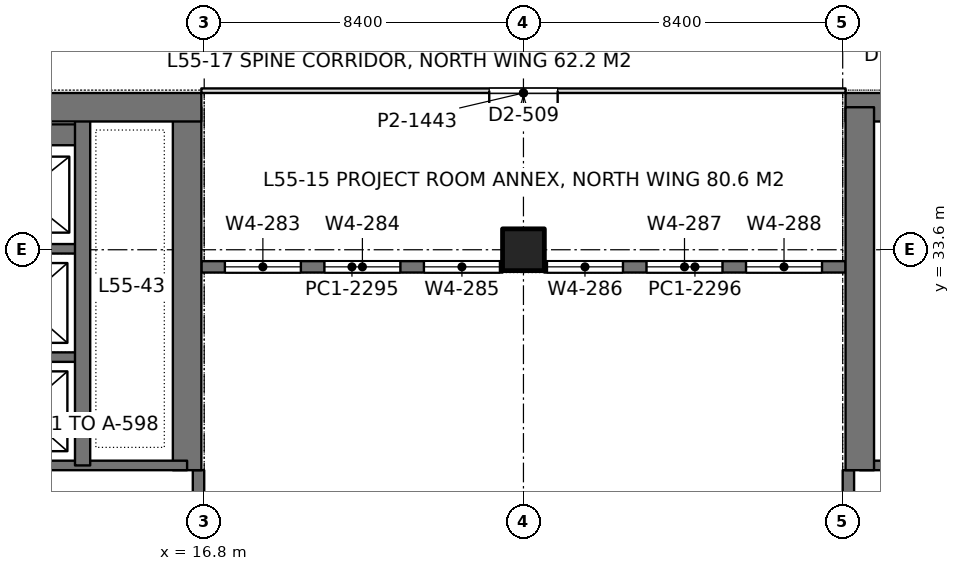
"""IFC4 building model, lengths in metres.
Left out: names, types, materials, properties, quantities, classifications, styles, units other than length and angle.
Written with IfcOpenShell. Run it as: python <this file> out.ifc"""

import sys

from ifc_helpers import new_model, si_unit, direction, frame, frame_2d, origin, origin_2d, place, context, subcontext, project, spatial, rectangle, extrude, element, fill, save


model = new_model("IFC4")
c1 = context("Model", 3, precision=1e-05, world=origin(), true_north=direction((0.0, 1.0)))
c2 = subcontext(c1, "Body", "Model", "MODEL_VIEW")
j1 = project(units=[si_unit("LENGTHUNIT", "METRE"), si_unit("PLANEANGLEUNIT", "RADIAN")], contexts=[c1])
p1 = place(None, origin())
s1 = spatial("IfcSite", under=j1, at=p1, CompositionType="ELEMENT")
p2 = place(p1, origin())
s2 = spatial("IfcBuilding", under=s1, at=p2, CompositionType="ELEMENT")
p3 = place(p2, frame((0.0, 0.0, 240.6)))
s3 = spatial("IfcBuildingStorey", under=s2, at=p3, CompositionType="ELEMENT", Elevation=240.6)
p4 = place(p3, frame((25.2, 33.6, 0.0), z_axis=(0.0, 0.0, 1.0), x_axis=(1.0, 0.0, 0.0)))
e1 = element("IfcColumn", 1, at=p4, inside=s3, PredefinedType="COLUMN", context=c2, shape_type="SweptSolid", body=[
    extrude(rectangle(XDim=1.1, YDim=1.1, at=origin_2d()), origin(), (0.0, 0.0, 1.0), 4.2),
])
p5 = place(p3, frame((-1.125, 37.35, 0.0), z_axis=(0.0, 0.0, 1.0), x_axis=(1.0, 0.0, 0.0)))
e2 = element("IfcWall", 2, at=p5, inside=s3, PredefinedType="SHEAR", context=c2, shape_type="SweptSolid", body=[
    extrude(rectangle(XDim=17.85, YDim=0.75, at=frame_2d((8.925, 0.0))), origin(), (0.0, 0.0, 1.0), 4.2),
])
p6 = place(p5, frame((8.875, 0.0, 0.0)))
e3 = element("IfcOpeningElement", 3, at=p6, cuts=e2, PredefinedType="OPENING", context=c2, shape_type="SweptSolid", body=[
    extrude(rectangle(XDim=1.8, YDim=2.4, at=frame_2d((0.9, 1.2))), frame((0.0, 0.385, 0.0), z_axis=(0.0, -1.0, 0.0), x_axis=(1.0, 0.0, 0.0)), (0.0, 0.0, 1.0), 0.77),
])
p7 = place(p3, frame((16.35, 27.8, 0.0), z_axis=(0.0, 0.0, 1.0), x_axis=(0.0, 1.0, 0.0)))
e4 = element("IfcWall", 4, at=p7, inside=s3, PredefinedType="SHEAR", context=c2, shape_type="SweptSolid", body=[
    extrude(rectangle(XDim=9.55, YDim=0.75, at=frame_2d((4.775, 0.0))), origin(), (0.0, 0.0, 1.0), 4.2),
])
p8 = place(p3, frame((13.6, 27.925, 0.0), z_axis=(0.0, 0.0, 1.0), x_axis=(0.0, 1.0, 0.0)))
e5 = element("IfcWall", 5, at=p8, inside=s3, PredefinedType="SHEAR", context=c2, shape_type="SweptSolid", body=[
    extrude(rectangle(XDim=9.425, YDim=0.4, at=frame_2d((4.712, 0.0))), origin(), (0.0, 0.0, 1.0), 4.2),
])
p9 = place(p3, frame((10.4, 27.925, 0.0), z_axis=(0.0, 0.0, 1.0), x_axis=(1.0, 0.0, 0.0)))
e6 = element("IfcWall", 6, at=p9, inside=s3, PredefinedType="SHEAR", context=c2, shape_type="SweptSolid", body=[
    extrude(rectangle(XDim=5.95, YDim=0.25, at=frame_2d((2.975, 0.0))), origin(), (0.0, 0.0, 1.0), 4.2),
])
for number, where, z_axis, x_axis in (
    (7, (10.4, 30.775, 0.0), (0.0, 0.0, 1.0), (1.0, 0.0, 0.0)),
    (8, (10.4, 33.625, 0.0), (0.0, 0.0, 1.0), (1.0, 0.0, 0.0)),
):
    element("IfcWall", number, at=place(p3, frame(where, z_axis=z_axis, x_axis=x_axis)), inside=s3, PredefinedType="SHEAR", context=c2, shape_type="SweptSolid", body=[
        extrude(rectangle(XDim=3.2, YDim=0.25, at=frame_2d((1.6, 0.0))), origin(), (0.0, 0.0, 1.0), 4.2),
    ])
p10 = place(p3, frame((10.4, 36.625, 0.0), z_axis=(0.0, 0.0, 1.0), x_axis=(1.0, 0.0, 0.0)))
e9 = element("IfcWall", 9, at=p10, inside=s3, PredefinedType="SHEAR", context=c2, shape_type="SweptSolid", body=[
    extrude(rectangle(XDim=3.2, YDim=0.55, at=frame_2d((1.6, 0.0))), origin(), (0.0, 0.0, 1.0), 4.2),
])
p11 = place(p3, frame((33.675, 37.35, 0.0), z_axis=(0.0, 0.0, 1.0), x_axis=(1.0, 0.0, 0.0)))
e10 = element("IfcWall", 10, at=p11, inside=s3, PredefinedType="SHEAR", context=c2, shape_type="SweptSolid", body=[
    extrude(rectangle(XDim=17.85, YDim=0.75, at=frame_2d((8.925, 0.0))), origin(), (0.0, 0.0, 1.0), 4.2),
])
p12 = place(p11, frame((7.175, 0.0, 0.0)))
e11 = element("IfcOpeningElement", 11, at=p12, cuts=e10, PredefinedType="OPENING", context=c2, shape_type="SweptSolid", body=[
    extrude(rectangle(XDim=1.8, YDim=2.4, at=frame_2d((0.9, 1.2))), frame((0.0, 0.385, 0.0), z_axis=(0.0, -1.0, 0.0), x_axis=(1.0, 0.0, 0.0)), (0.0, 0.0, 1.0), 0.77),
])
p13 = place(p3, frame((34.05, 27.8, 0.0), z_axis=(0.0, 0.0, 1.0), x_axis=(0.0, 1.0, 0.0)))
e12 = element("IfcWall", 12, at=p13, inside=s3, PredefinedType="SHEAR", context=c2, shape_type="SweptSolid", body=[
    extrude(rectangle(XDim=9.55, YDim=0.75, at=frame_2d((4.775, 0.0))), origin(), (0.0, 0.0, 1.0), 4.2),
])
p14 = place(p3, frame((40.0, 27.925, 0.0), z_axis=(0.0, 0.0, 1.0), x_axis=(-1.0, 0.0, 0.0)))
e13 = element("IfcWall", 13, at=p14, inside=s3, PredefinedType="SHEAR", context=c2, shape_type="SweptSolid", body=[
    extrude(rectangle(XDim=5.95, YDim=0.25, at=frame_2d((2.975, 0.0))), origin(), (0.0, 0.0, 1.0), 4.2),
])
p15 = place(p3, frame((16.65, 17.1, 0.0), z_axis=(0.0, 0.0, 1.0), x_axis=(0.0, 1.0, 0.0)))
e14 = element("IfcWall", 14, at=p15, inside=s3, PredefinedType="SOLIDWALL", context=c2, shape_type="SweptSolid", body=[
    extrude(rectangle(XDim=10.7, YDim=0.3, at=frame_2d((5.35, 0.0))), origin(), (0.0, 0.0, 1.0), 4.0),
])
p16 = place(p15, frame((0.55, 0.0, 0.9)))
e15 = element("IfcOpeningElement", 15, at=p16, cuts=e14, PredefinedType="OPENING", context=c2, shape_type="SweptSolid", body=[
    extrude(rectangle(XDim=2.0, YDim=1.9, at=frame_2d((1.0, 0.95))), frame((0.0, 0.16, 0.0), z_axis=(0.0, -1.0, 0.0), x_axis=(1.0, 0.0, 0.0)), (0.0, 0.0, 1.0), 0.32),
])
p17 = place(p15, frame((2.9, 0.0, 0.9)))
e16 = element("IfcOpeningElement", 16, at=p17, cuts=e14, PredefinedType="OPENING", context=c2, shape_type="SweptSolid", body=[
    extrude(rectangle(XDim=2.0, YDim=1.9, at=frame_2d((1.0, 0.95))), frame((0.0, 0.16, 0.0), z_axis=(0.0, -1.0, 0.0), x_axis=(1.0, 0.0, 0.0)), (0.0, 0.0, 1.0), 0.32),
])
p18 = place(p15, frame((7.675, 0.0, 0.9)))
e17 = element("IfcOpeningElement", 17, at=p18, cuts=e14, PredefinedType="OPENING", context=c2, shape_type="SweptSolid", body=[
    extrude(rectangle(XDim=2.0, YDim=1.9, at=frame_2d((1.0, 0.95))), frame((0.0, 0.16, 0.0), z_axis=(0.0, -1.0, 0.0), x_axis=(1.0, 0.0, 0.0)), (0.0, 0.0, 1.0), 0.32),
])
p19 = place(p3, frame((33.75, 17.1, 0.0), z_axis=(0.0, 0.0, 1.0), x_axis=(0.0, 1.0, 0.0)))
e18 = element("IfcWall", 18, at=p19, inside=s3, PredefinedType="SOLIDWALL", context=c2, shape_type="SweptSolid", body=[
    extrude(rectangle(XDim=10.7, YDim=0.3, at=frame_2d((5.35, 0.0))), origin(), (0.0, 0.0, 1.0), 4.0),
])
p20 = place(p19, frame((0.55, 0.0, 0.9)))
e19 = element("IfcOpeningElement", 19, at=p20, cuts=e18, PredefinedType="OPENING", context=c2, shape_type="SweptSolid", body=[
    extrude(rectangle(XDim=2.0, YDim=1.9, at=frame_2d((1.0, 0.95))), frame((0.0, 0.16, 0.0), z_axis=(0.0, -1.0, 0.0), x_axis=(1.0, 0.0, 0.0)), (0.0, 0.0, 1.0), 0.32),
])
p21 = place(p19, frame((2.9, 0.0, 0.9)))
e20 = element("IfcOpeningElement", 20, at=p21, cuts=e18, PredefinedType="OPENING", context=c2, shape_type="SweptSolid", body=[
    extrude(rectangle(XDim=2.0, YDim=1.9, at=frame_2d((1.0, 0.95))), frame((0.0, 0.16, 0.0), z_axis=(0.0, -1.0, 0.0), x_axis=(1.0, 0.0, 0.0)), (0.0, 0.0, 1.0), 0.32),
])
p22 = place(p19, frame((7.675, 0.0, 0.9)))
e21 = element("IfcOpeningElement", 21, at=p22, cuts=e18, PredefinedType="OPENING", context=c2, shape_type="SweptSolid", body=[
    extrude(rectangle(XDim=2.0, YDim=1.9, at=frame_2d((1.0, 0.95))), frame((0.0, 0.16, 0.0), z_axis=(0.0, -1.0, 0.0), x_axis=(1.0, 0.0, 0.0)), (0.0, 0.0, 1.0), 0.32),
])
p23 = place(p3, frame((16.725, 33.15, 0.0), z_axis=(0.0, 0.0, 1.0), x_axis=(1.0, 0.0, 0.0)))
e22 = element("IfcWall", 22, at=p23, inside=s3, PredefinedType="SOLIDWALL", context=c2, shape_type="SweptSolid", body=[
    extrude(rectangle(XDim=7.925, YDim=0.3, at=frame_2d((3.962, 0.0))), origin(), (0.0, 0.0, 1.0), 4.0),
])
p24 = place(p23, frame((0.619, 0.0, 0.9)))
e23 = element("IfcOpeningElement", 23, at=p24, cuts=e22, PredefinedType="OPENING", context=c2, shape_type="SweptSolid", body=[
    extrude(rectangle(XDim=2.0, YDim=1.9, at=frame_2d((1.0, 0.95))), frame((0.0, 0.16, 0.0), z_axis=(0.0, -1.0, 0.0), x_axis=(1.0, 0.0, 0.0)), (0.0, 0.0, 1.0), 0.32),
])
p25 = place(p23, frame((3.238, 0.0, 0.9)))
e24 = element("IfcOpeningElement", 24, at=p25, cuts=e22, PredefinedType="OPENING", context=c2, shape_type="SweptSolid", body=[
    extrude(rectangle(XDim=2.0, YDim=1.9, at=frame_2d((1.0, 0.95))), frame((0.0, 0.16, 0.0), z_axis=(0.0, -1.0, 0.0), x_axis=(1.0, 0.0, 0.0)), (0.0, 0.0, 1.0), 0.32),
])
p26 = place(p23, frame((5.856, 0.0, 0.9)))
e25 = element("IfcOpeningElement", 25, at=p26, cuts=e22, PredefinedType="OPENING", context=c2, shape_type="SweptSolid", body=[
    extrude(rectangle(XDim=2.0, YDim=1.9, at=frame_2d((1.0, 0.95))), frame((0.0, 0.16, 0.0), z_axis=(0.0, -1.0, 0.0), x_axis=(1.0, 0.0, 0.0)), (0.0, 0.0, 1.0), 0.32),
])
p27 = place(p3, frame((25.75, 33.15, 0.0), z_axis=(0.0, 0.0, 1.0), x_axis=(1.0, 0.0, 0.0)))
e26 = element("IfcWall", 26, at=p27, inside=s3, PredefinedType="SOLIDWALL", context=c2, shape_type="SweptSolid", body=[
    extrude(rectangle(XDim=7.925, YDim=0.3, at=frame_2d((3.962, 0.0))), origin(), (0.0, 0.0, 1.0), 4.0),
])
p28 = place(p27, frame((0.069, 0.0, 0.9)))
e27 = element("IfcOpeningElement", 27, at=p28, cuts=e26, PredefinedType="OPENING", context=c2, shape_type="SweptSolid", body=[
    extrude(rectangle(XDim=2.0, YDim=1.9, at=frame_2d((1.0, 0.95))), frame((0.0, 0.16, 0.0), z_axis=(0.0, -1.0, 0.0), x_axis=(1.0, 0.0, 0.0)), (0.0, 0.0, 1.0), 0.32),
])
p29 = place(p27, frame((2.688, 0.0, 0.9)))
e28 = element("IfcOpeningElement", 28, at=p29, cuts=e26, PredefinedType="OPENING", context=c2, shape_type="SweptSolid", body=[
    extrude(rectangle(XDim=2.0, YDim=1.9, at=frame_2d((1.0, 0.95))), frame((0.0, 0.16, 0.0), z_axis=(0.0, -1.0, 0.0), x_axis=(1.0, 0.0, 0.0)), (0.0, 0.0, 1.0), 0.32),
])
p30 = place(p27, frame((5.306, 0.0, 0.9)))
e29 = element("IfcOpeningElement", 29, at=p30, cuts=e26, PredefinedType="OPENING", context=c2, shape_type="SweptSolid", body=[
    extrude(rectangle(XDim=2.0, YDim=1.9, at=frame_2d((1.0, 0.95))), frame((0.0, 0.16, 0.0), z_axis=(0.0, -1.0, 0.0), x_axis=(1.0, 0.0, 0.0)), (0.0, 0.0, 1.0), 0.32),
])
p31 = place(p3, frame((16.725, 37.785, 0.0), z_axis=(0.0, 0.0, 1.0), x_axis=(1.0, 0.0, 0.0)))
e30 = element("IfcWall", 30, at=p31, inside=s3, PredefinedType="PARTITIONING", context=c2, shape_type="SweptSolid", body=[
    extrude(rectangle(XDim=16.95, YDim=0.12, at=frame_2d((8.475, 0.0))), origin(), (0.0, 0.0, 1.0), 3.3),
])
p32 = place(p31, frame((7.575, 0.0, 0.0)))
e31 = element("IfcOpeningElement", 31, at=p32, cuts=e30, PredefinedType="OPENING", context=c2, shape_type="SweptSolid", body=[
    extrude(rectangle(XDim=1.8, YDim=2.2, at=frame_2d((0.9, 1.1))), frame((0.0, 0.07, 0.0), z_axis=(0.0, -1.0, 0.0), x_axis=(1.0, 0.0, 0.0)), (0.0, 0.0, 1.0), 0.14),
])
p33 = place(p24, origin())
e32 = element("IfcWindow", 32, at=p33, inside=s3, PartitioningType="SINGLE_PANEL", PredefinedType="WINDOW", context=c2, shape_type="SweptSolid", body=[
    extrude(rectangle(XDim=2.0, YDim=1.9, at=frame_2d((1.0, 0.95))), frame((0.0, 0.03, 0.0), z_axis=(0.0, -1.0, 0.0), x_axis=(1.0, 0.0, 0.0)), (0.0, 0.0, 1.0), 0.06),
])
fill(e23, e32)
p34 = place(p25, origin())
e33 = element("IfcWindow", 33, at=p34, inside=s3, PartitioningType="SINGLE_PANEL", PredefinedType="WINDOW", context=c2, shape_type="SweptSolid", body=[
    extrude(rectangle(XDim=2.0, YDim=1.9, at=frame_2d((1.0, 0.95))), frame((0.0, 0.03, 0.0), z_axis=(0.0, -1.0, 0.0), x_axis=(1.0, 0.0, 0.0)), (0.0, 0.0, 1.0), 0.06),
])
fill(e24, e33)
p35 = place(p26, origin())
e34 = element("IfcWindow", 34, at=p35, inside=s3, PartitioningType="SINGLE_PANEL", PredefinedType="WINDOW", context=c2, shape_type="SweptSolid", body=[
    extrude(rectangle(XDim=2.0, YDim=1.9, at=frame_2d((1.0, 0.95))), frame((0.0, 0.03, 0.0), z_axis=(0.0, -1.0, 0.0), x_axis=(1.0, 0.0, 0.0)), (0.0, 0.0, 1.0), 0.06),
])
fill(e25, e34)
p36 = place(p28, origin())
e35 = element("IfcWindow", 35, at=p36, inside=s3, PartitioningType="SINGLE_PANEL", PredefinedType="WINDOW", context=c2, shape_type="SweptSolid", body=[
    extrude(rectangle(XDim=2.0, YDim=1.9, at=frame_2d((1.0, 0.95))), frame((0.0, 0.03, 0.0), z_axis=(0.0, -1.0, 0.0), x_axis=(1.0, 0.0, 0.0)), (0.0, 0.0, 1.0), 0.06),
])
fill(e27, e35)
p37 = place(p29, origin())
e36 = element("IfcWindow", 36, at=p37, inside=s3, PartitioningType="SINGLE_PANEL", PredefinedType="WINDOW", context=c2, shape_type="SweptSolid", body=[
    extrude(rectangle(XDim=2.0, YDim=1.9, at=frame_2d((1.0, 0.95))), frame((0.0, 0.03, 0.0), z_axis=(0.0, -1.0, 0.0), x_axis=(1.0, 0.0, 0.0)), (0.0, 0.0, 1.0), 0.06),
])
fill(e28, e36)
p38 = place(p30, origin())
e37 = element("IfcWindow", 37, at=p38, inside=s3, PartitioningType="SINGLE_PANEL", PredefinedType="WINDOW", context=c2, shape_type="SweptSolid", body=[
    extrude(rectangle(XDim=2.0, YDim=1.9, at=frame_2d((1.0, 0.95))), frame((0.0, 0.03, 0.0), z_axis=(0.0, -1.0, 0.0), x_axis=(1.0, 0.0, 0.0)), (0.0, 0.0, 1.0), 0.06),
])
fill(e29, e37)
p39 = place(p32, frame((1.8, 0.0, 0.0), z_axis=(0.0, 0.0, 1.0), x_axis=(-1.0, 0.0, 0.0)))
e38 = element("IfcDoor", 38, at=p39, inside=s3, OperationType="DOUBLE_DOOR_SINGLE_SWING", PredefinedType="DOOR", context=c2, shape_type="SweptSolid", body=[
    extrude(rectangle(XDim=1.8, YDim=2.2, at=frame_2d((0.9, 1.1))), frame((0.0, 0.025, 0.0), z_axis=(0.0, -1.0, 0.0), x_axis=(1.0, 0.0, 0.0)), (0.0, 0.0, 1.0), 0.05),
])
fill(e31, e38)
save(model, sys.argv[1])
